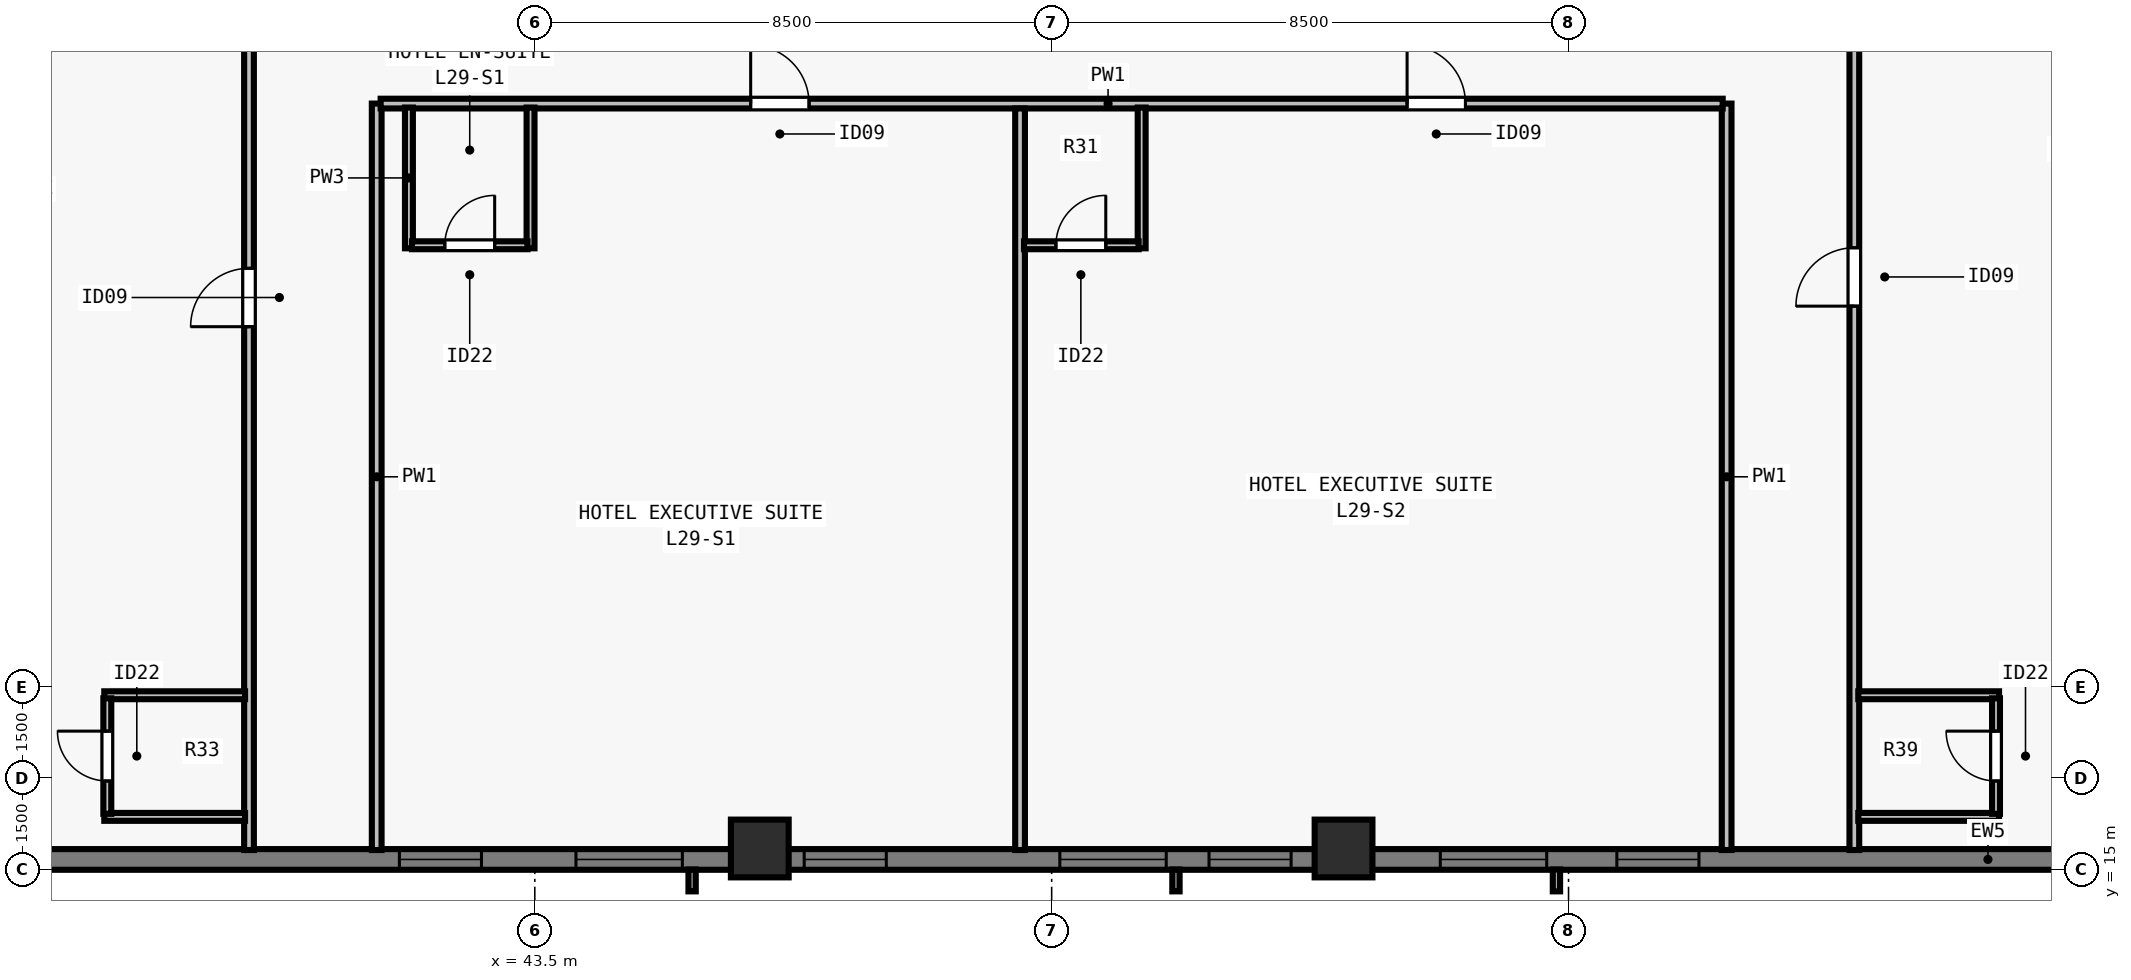
"""IFC4 building model, lengths in metres.
Left out: names, types, materials, properties, quantities, classifications, styles, units other than length and angle.
Written with IfcOpenShell. Run it as: python <this file> out.ifc"""

import sys

from ifc_helpers import new_model, si_unit, direction, frame, frame_2d, origin, origin_2d, place, context, subcontext, project, spatial, rectangle, extrude, element, fill, save


model = new_model("IFC4")
c1 = context("Model", 3, precision=1e-05, world=origin(), true_north=direction((0.0, 1.0)))
c2 = subcontext(c1, "Body", "Model", "MODEL_VIEW")
j1 = project(units=[si_unit("LENGTHUNIT", "METRE"), si_unit("PLANEANGLEUNIT", "RADIAN")], contexts=[c1])
p1 = place(None, origin())
s1 = spatial("IfcSite", under=j1, at=p1, CompositionType="ELEMENT")
p2 = place(p1, origin())
s2 = spatial("IfcBuilding", under=s1, at=p2, CompositionType="ELEMENT")
p3 = place(p2, frame((0.0, 0.0, 109.5)))
s3 = spatial("IfcBuildingStorey", under=s2, at=p3, CompositionType="ELEMENT", Elevation=109.5)
for number, where, z_axis, x_axis in (
    (1, (47.2, 15.35, 0.0), (0.0, 0.0, 1.0), (1.0, 0.0, 0.0)),
    (2, (56.8, 15.35, 0.0), (0.0, 0.0, 1.0), (1.0, 0.0, 0.0)),
):
    element("IfcColumn", number, at=place(p3, frame(where, z_axis=z_axis, x_axis=x_axis)), inside=s3, PredefinedType="COLUMN", context=c2, shape_type="SweptSolid", body=[
        extrude(rectangle(XDim=0.95, YDim=0.95, at=origin_2d()), origin(), (0.0, 0.0, 1.0), 3.5),
    ])
p4 = place(p3, frame((72.0, 15.17, 0.0), z_axis=(0.0, 0.0, 1.0), x_axis=(-1.0, 0.0, 0.0)))
e3 = element("IfcWall", 3, at=p4, inside=s3, PredefinedType="SOLIDWALL", context=c2, shape_type="SweptSolid", body=[
    extrude(rectangle(XDim=39.682, YDim=0.34, at=frame_2d((19.841, 0.0))), origin(), (0.0, 0.0, 1.0), 3.28),
])
p5 = place(p4, frame((9.355, 0.0, 0.8)))
e4 = element("IfcOpeningElement", 4, at=p5, cuts=e3, PredefinedType="OPENING", context=c2, shape_type="SweptSolid", body=[
    extrude(rectangle(XDim=1.35, YDim=1.66, at=frame_2d((0.675, 0.83))), frame((0.0, 0.18, 0.0), z_axis=(0.0, -1.0, 0.0), x_axis=(1.0, 0.0, 0.0)), (0.0, 0.0, 1.0), 0.36),
])
p6 = place(p4, frame((11.859, 0.0, 0.8)))
e5 = element("IfcOpeningElement", 5, at=p6, cuts=e3, PredefinedType="OPENING", context=c2, shape_type="SweptSolid", body=[
    extrude(rectangle(XDim=1.75, YDim=1.66, at=frame_2d((0.875, 0.83))), frame((0.0, 0.18, 0.0), z_axis=(0.0, -1.0, 0.0), x_axis=(1.0, 0.0, 0.0)), (0.0, 0.0, 1.0), 0.36),
])
p7 = place(p4, frame((16.062, 0.0, 0.8)))
e6 = element("IfcOpeningElement", 6, at=p7, cuts=e3, PredefinedType="OPENING", context=c2, shape_type="SweptSolid", body=[
    extrude(rectangle(XDim=1.35, YDim=1.66, at=frame_2d((0.675, 0.83))), frame((0.0, 0.18, 0.0), z_axis=(0.0, -1.0, 0.0), x_axis=(1.0, 0.0, 0.0)), (0.0, 0.0, 1.0), 0.36),
])
p8 = place(p4, frame((18.116, 0.0, 0.8)))
e7 = element("IfcOpeningElement", 7, at=p8, cuts=e3, PredefinedType="OPENING", context=c2, shape_type="SweptSolid", body=[
    extrude(rectangle(XDim=1.75, YDim=1.66, at=frame_2d((0.875, 0.83))), frame((0.0, 0.18, 0.0), z_axis=(0.0, -1.0, 0.0), x_axis=(1.0, 0.0, 0.0)), (0.0, 0.0, 1.0), 0.36),
])
p9 = place(p4, frame((22.719, 0.0, 0.8)))
e8 = element("IfcOpeningElement", 8, at=p9, cuts=e3, PredefinedType="OPENING", context=c2, shape_type="SweptSolid", body=[
    extrude(rectangle(XDim=1.35, YDim=1.66, at=frame_2d((0.675, 0.83))), frame((0.0, 0.18, 0.0), z_axis=(0.0, -1.0, 0.0), x_axis=(1.0, 0.0, 0.0)), (0.0, 0.0, 1.0), 0.36),
])
p10 = place(p4, frame((26.073, 0.0, 0.8)))
e9 = element("IfcOpeningElement", 9, at=p10, cuts=e3, PredefinedType="OPENING", context=c2, shape_type="SweptSolid", body=[
    extrude(rectangle(XDim=1.75, YDim=1.66, at=frame_2d((0.875, 0.83))), frame((0.0, 0.18, 0.0), z_axis=(0.0, -1.0, 0.0), x_axis=(1.0, 0.0, 0.0)), (0.0, 0.0, 1.0), 0.36),
])
p11 = place(p4, frame((29.377, 0.0, 0.8)))
e10 = element("IfcOpeningElement", 10, at=p11, cuts=e3, PredefinedType="OPENING", context=c2, shape_type="SweptSolid", body=[
    extrude(rectangle(XDim=1.35, YDim=1.66, at=frame_2d((0.675, 0.83))), frame((0.0, 0.18, 0.0), z_axis=(0.0, -1.0, 0.0), x_axis=(1.0, 0.0, 0.0)), (0.0, 0.0, 1.0), 0.36),
])
p12 = place(p3, frame((38.8, 15.325, 0.0), z_axis=(0.0, 0.0, 1.0), x_axis=(0.0, 1.0, 0.0)))
e11 = element("IfcWall", 11, at=p12, inside=s3, PredefinedType="PARTITIONING", context=c2, shape_type="SweptSolid", body=[
    extrude(rectangle(XDim=47.35, YDim=0.16, at=frame_2d((23.675, 0.0))), origin(), (0.0, 0.0, 1.0), 2.555),
])
p13 = place(p12, frame((8.606, 0.0, 0.0)))
e12 = element("IfcOpeningElement", 12, at=p13, cuts=e11, PredefinedType="OPENING", context=c2, shape_type="SweptSolid", body=[
    extrude(rectangle(XDim=0.96, YDim=2.15, at=frame_2d((0.48, 1.075))), frame((0.0, 0.09, 0.0), z_axis=(0.0, -1.0, 0.0), x_axis=(1.0, 0.0, 0.0)), (0.0, 0.0, 1.0), 0.18),
])
p14 = place(p12, frame((24.218, 0.0, 0.0)))
e13 = element("IfcOpeningElement", 13, at=p14, cuts=e11, PredefinedType="OPENING", context=c2, shape_type="SweptSolid", body=[
    extrude(rectangle(XDim=0.96, YDim=2.15, at=frame_2d((0.48, 1.075))), frame((0.0, 0.09, 0.0), z_axis=(0.0, -1.0, 0.0), x_axis=(1.0, 0.0, 0.0)), (0.0, 0.0, 1.0), 0.18),
])
p15 = place(p12, frame((40.107, 0.0, 0.0)))
e14 = element("IfcOpeningElement", 14, at=p15, cuts=e11, PredefinedType="OPENING", context=c2, shape_type="SweptSolid", body=[
    extrude(rectangle(XDim=0.96, YDim=2.15, at=frame_2d((0.48, 1.075))), frame((0.0, 0.09, 0.0), z_axis=(0.0, -1.0, 0.0), x_axis=(1.0, 0.0, 0.0)), (0.0, 0.0, 1.0), 0.18),
])
p16 = place(p3, frame((40.9, 15.325, 0.0), z_axis=(0.0, 0.0, 1.0), x_axis=(0.0, 1.0, 0.0)))
e15 = element("IfcWall", 15, at=p16, inside=s3, PredefinedType="PARTITIONING", context=c2, shape_type="SweptSolid", body=[
    extrude(rectangle(XDim=12.275, YDim=0.16, at=frame_2d((6.138, 0.0))), origin(), (0.0, 0.0, 1.0), 2.555),
])
p17 = place(p3, frame((65.2, 15.325, 0.0), z_axis=(0.0, 0.0, 1.0), x_axis=(0.0, 1.0, 0.0)))
e16 = element("IfcWall", 16, at=p17, inside=s3, PredefinedType="PARTITIONING", context=c2, shape_type="SweptSolid", body=[
    extrude(rectangle(XDim=47.35, YDim=0.16, at=frame_2d((23.675, 0.0))), origin(), (0.0, 0.0, 1.0), 2.555),
])
p18 = place(p17, frame((8.944, 0.0, 0.0)))
e17 = element("IfcOpeningElement", 17, at=p18, cuts=e16, PredefinedType="OPENING", context=c2, shape_type="SweptSolid", body=[
    extrude(rectangle(XDim=0.96, YDim=2.15, at=frame_2d((0.48, 1.075))), frame((0.0, 0.09, 0.0), z_axis=(0.0, -1.0, 0.0), x_axis=(1.0, 0.0, 0.0)), (0.0, 0.0, 1.0), 0.18),
])
p19 = place(p17, frame((24.322, 0.0, 0.0)))
e18 = element("IfcOpeningElement", 18, at=p19, cuts=e16, PredefinedType="OPENING", context=c2, shape_type="SweptSolid", body=[
    extrude(rectangle(XDim=0.96, YDim=2.15, at=frame_2d((0.48, 1.075))), frame((0.0, 0.09, 0.0), z_axis=(0.0, -1.0, 0.0), x_axis=(1.0, 0.0, 0.0)), (0.0, 0.0, 1.0), 0.18),
])
p20 = place(p17, frame((39.873, 0.0, 0.0)))
e19 = element("IfcOpeningElement", 19, at=p20, cuts=e16, PredefinedType="OPENING", context=c2, shape_type="SweptSolid", body=[
    extrude(rectangle(XDim=0.96, YDim=2.15, at=frame_2d((0.48, 1.075))), frame((0.0, 0.09, 0.0), z_axis=(0.0, -1.0, 0.0), x_axis=(1.0, 0.0, 0.0)), (0.0, 0.0, 1.0), 0.18),
])
p21 = place(p3, frame((63.1, 15.325, 0.0), z_axis=(0.0, 0.0, 1.0), x_axis=(0.0, 1.0, 0.0)))
e20 = element("IfcWall", 20, at=p21, inside=s3, PredefinedType="PARTITIONING", context=c2, shape_type="SweptSolid", body=[
    extrude(rectangle(XDim=12.275, YDim=0.16, at=frame_2d((6.138, 0.0))), origin(), (0.0, 0.0, 1.0), 2.555),
])
p22 = place(p3, frame((40.965, 27.6, 0.0), z_axis=(0.0, 0.0, 1.0), x_axis=(1.0, 0.0, 0.0)))
e21 = element("IfcWall", 21, at=p22, inside=s3, PredefinedType="PARTITIONING", context=c2, shape_type="SweptSolid", body=[
    extrude(rectangle(XDim=22.07, YDim=0.16, at=frame_2d((11.035, 0.0))), origin(), (0.0, 0.0, 1.0), 3.28),
])
p23 = place(p22, frame((6.085, 0.0, 0.0)))
e22 = element("IfcOpeningElement", 22, at=p23, cuts=e21, PredefinedType="OPENING", context=c2, shape_type="SweptSolid", body=[
    extrude(rectangle(XDim=0.96, YDim=2.15, at=frame_2d((0.48, 1.075))), frame((0.0, 0.09, 0.0), z_axis=(0.0, -1.0, 0.0), x_axis=(1.0, 0.0, 0.0)), (0.0, 0.0, 1.0), 0.18),
])
p24 = place(p22, frame((16.88, 0.0, 0.0)))
e23 = element("IfcOpeningElement", 23, at=p24, cuts=e21, PredefinedType="OPENING", context=c2, shape_type="SweptSolid", body=[
    extrude(rectangle(XDim=0.96, YDim=2.15, at=frame_2d((0.48, 1.075))), frame((0.0, 0.09, 0.0), z_axis=(0.0, -1.0, 0.0), x_axis=(1.0, 0.0, 0.0)), (0.0, 0.0, 1.0), 0.18),
])
for number, where, z_axis, x_axis in (
    (24, (41.43, 25.22, 0.0), (0.0, 0.0, 1.0), (0.0, 1.0, 0.0)),
    (25, (43.43, 25.22, 0.0), (0.0, 0.0, 1.0), (0.0, 1.0, 0.0)),
):
    element("IfcWall", number, at=place(p3, frame(where, z_axis=z_axis, x_axis=x_axis)), inside=s3, PredefinedType="PLUMBINGWALL", context=c2, shape_type="SweptSolid", body=[
        extrude(rectangle(XDim=2.315, YDim=0.13, at=frame_2d((1.157, 0.0))), origin(), (0.0, 0.0, 1.0), 3.28),
    ])
p25 = place(p3, frame((41.48, 25.27, 0.0), z_axis=(0.0, 0.0, 1.0), x_axis=(1.0, 0.0, 0.0)))
e26 = element("IfcWall", 26, at=p25, inside=s3, PredefinedType="PLUMBINGWALL", context=c2, shape_type="SweptSolid", body=[
    extrude(rectangle(XDim=1.9, YDim=0.13, at=frame_2d((0.95, 0.0))), origin(), (0.0, 0.0, 1.0), 3.28),
])
p26 = place(p25, frame((0.54, 0.0, 0.0)))
e27 = element("IfcOpeningElement", 27, at=p26, cuts=e26, PredefinedType="OPENING", context=c2, shape_type="SweptSolid", body=[
    extrude(rectangle(XDim=0.82, YDim=2.1, at=frame_2d((0.41, 1.05))), frame((0.0, 0.075, 0.0), z_axis=(0.0, -1.0, 0.0), x_axis=(1.0, 0.0, 0.0)), (0.0, 0.0, 1.0), 0.15),
])
p27 = place(p3, frame((51.48, 15.325, 0.0), z_axis=(0.0, 0.0, 1.0), x_axis=(0.0, 1.0, 0.0)))
e28 = element("IfcWall", 28, at=p27, inside=s3, PredefinedType="PARTITIONING", context=c2, shape_type="SweptSolid", body=[
    extrude(rectangle(XDim=12.195, YDim=0.16, at=frame_2d((6.098, 0.0))), origin(), (0.0, 0.0, 1.0), 2.896),
])
p28 = place(p3, frame((53.48, 25.22, 0.0), z_axis=(0.0, 0.0, 1.0), x_axis=(0.0, 1.0, 0.0)))
e29 = element("IfcWall", 29, at=p28, inside=s3, PredefinedType="PLUMBINGWALL", context=c2, shape_type="SweptSolid", body=[
    extrude(rectangle(XDim=2.315, YDim=0.13, at=frame_2d((1.157, 0.0))), origin(), (0.0, 0.0, 1.0), 2.896),
])
p29 = place(p3, frame((51.545, 25.27, 0.0), z_axis=(0.0, 0.0, 1.0), x_axis=(1.0, 0.0, 0.0)))
e30 = element("IfcWall", 30, at=p29, inside=s3, PredefinedType="PLUMBINGWALL", context=c2, shape_type="SweptSolid", body=[
    extrude(rectangle(XDim=1.885, YDim=0.13, at=frame_2d((0.942, 0.0))), origin(), (0.0, 0.0, 1.0), 3.28),
])
p30 = place(p29, frame((0.525, 0.0, 0.0)))
e31 = element("IfcOpeningElement", 31, at=p30, cuts=e30, PredefinedType="OPENING", context=c2, shape_type="SweptSolid", body=[
    extrude(rectangle(XDim=0.82, YDim=2.1, at=frame_2d((0.41, 1.05))), frame((0.0, 0.075, 0.0), z_axis=(0.0, -1.0, 0.0), x_axis=(1.0, 0.0, 0.0)), (0.0, 0.0, 1.0), 0.15),
])
for number, where, z_axis, x_axis in (
    (32, (36.42, 15.87, 0.0), (0.0, 0.0, 1.0), (1.0, 0.0, 0.0)),
    (33, (36.42, 17.87, 0.0), (0.0, 0.0, 1.0), (1.0, 0.0, 0.0)),
):
    element("IfcWall", number, at=place(p3, frame(where, z_axis=z_axis, x_axis=x_axis)), inside=s3, PredefinedType="PLUMBINGWALL", context=c2, shape_type="SweptSolid", body=[
        extrude(rectangle(XDim=2.315, YDim=0.13, at=frame_2d((1.158, 0.0))), origin(), (0.0, 0.0, 1.0), 3.28),
    ])
p31 = place(p3, frame((36.47, 15.92, 0.0), z_axis=(0.0, 0.0, 1.0), x_axis=(0.0, 1.0, 0.0)))
e34 = element("IfcWall", 34, at=p31, inside=s3, PredefinedType="PLUMBINGWALL", context=c2, shape_type="SweptSolid", body=[
    extrude(rectangle(XDim=1.9, YDim=0.13, at=frame_2d((0.95, 0.0))), origin(), (0.0, 0.0, 1.0), 3.28),
])
p32 = place(p31, frame((0.54, 0.0, 0.0)))
e35 = element("IfcOpeningElement", 35, at=p32, cuts=e34, PredefinedType="OPENING", context=c2, shape_type="SweptSolid", body=[
    extrude(rectangle(XDim=0.82, YDim=2.1, at=frame_2d((0.41, 1.05))), frame((0.0, 0.075, 0.0), z_axis=(0.0, -1.0, 0.0), x_axis=(1.0, 0.0, 0.0)), (0.0, 0.0, 1.0), 0.15),
])
for number, where, z_axis, x_axis in (
    (36, (65.265, 15.87, 0.0), (0.0, 0.0, 1.0), (1.0, 0.0, 0.0)),
    (37, (65.265, 17.87, 0.0), (0.0, 0.0, 1.0), (1.0, 0.0, 0.0)),
):
    element("IfcWall", number, at=place(p3, frame(where, z_axis=z_axis, x_axis=x_axis)), inside=s3, PredefinedType="PLUMBINGWALL", context=c2, shape_type="SweptSolid", body=[
        extrude(rectangle(XDim=2.315, YDim=0.13, at=frame_2d((1.158, 0.0))), origin(), (0.0, 0.0, 1.0), 3.28),
    ])
p33 = place(p3, frame((67.53, 15.92, 0.0), z_axis=(0.0, 0.0, 1.0), x_axis=(0.0, 1.0, 0.0)))
e38 = element("IfcWall", 38, at=p33, inside=s3, PredefinedType="PLUMBINGWALL", context=c2, shape_type="SweptSolid", body=[
    extrude(rectangle(XDim=1.9, YDim=0.13, at=frame_2d((0.95, 0.0))), origin(), (0.0, 0.0, 1.0), 3.28),
])
p34 = place(p33, frame((0.54, 0.0, 0.0)))
e39 = element("IfcOpeningElement", 39, at=p34, cuts=e38, PredefinedType="OPENING", context=c2, shape_type="SweptSolid", body=[
    extrude(rectangle(XDim=0.82, YDim=2.1, at=frame_2d((0.41, 1.05))), frame((0.0, 0.075, 0.0), z_axis=(0.0, -1.0, 0.0), x_axis=(1.0, 0.0, 0.0)), (0.0, 0.0, 1.0), 0.15),
])
p35 = place(p5, origin())
e40 = element("IfcWindow", 40, at=p35, inside=s3, PartitioningType="SINGLE_PANEL", PredefinedType="WINDOW", context=c2, shape_type="SweptSolid", body=[
    extrude(rectangle(XDim=1.35, YDim=1.66, at=frame_2d((0.675, 0.83))), frame((0.0, -0.05, 0.0), z_axis=(0.0, -1.0, 0.0), x_axis=(1.0, 0.0, 0.0)), (0.0, 0.0, 1.0), 0.06),
])
fill(e4, e40)
p36 = place(p6, origin())
e41 = element("IfcWindow", 41, at=p36, inside=s3, PartitioningType="SINGLE_PANEL", PredefinedType="WINDOW", context=c2, shape_type="SweptSolid", body=[
    extrude(rectangle(XDim=1.75, YDim=1.66, at=frame_2d((0.875, 0.83))), frame((0.0, -0.05, 0.0), z_axis=(0.0, -1.0, 0.0), x_axis=(1.0, 0.0, 0.0)), (0.0, 0.0, 1.0), 0.06),
])
fill(e5, e41)
p37 = place(p7, origin())
e42 = element("IfcWindow", 42, at=p37, inside=s3, PartitioningType="SINGLE_PANEL", PredefinedType="WINDOW", context=c2, shape_type="SweptSolid", body=[
    extrude(rectangle(XDim=1.35, YDim=1.66, at=frame_2d((0.675, 0.83))), frame((0.0, -0.05, 0.0), z_axis=(0.0, -1.0, 0.0), x_axis=(1.0, 0.0, 0.0)), (0.0, 0.0, 1.0), 0.06),
])
fill(e6, e42)
p38 = place(p8, origin())
e43 = element("IfcWindow", 43, at=p38, inside=s3, PartitioningType="SINGLE_PANEL", PredefinedType="WINDOW", context=c2, shape_type="SweptSolid", body=[
    extrude(rectangle(XDim=1.75, YDim=1.66, at=frame_2d((0.875, 0.83))), frame((0.0, -0.05, 0.0), z_axis=(0.0, -1.0, 0.0), x_axis=(1.0, 0.0, 0.0)), (0.0, 0.0, 1.0), 0.06),
])
fill(e7, e43)
p39 = place(p9, origin())
e44 = element("IfcWindow", 44, at=p39, inside=s3, PartitioningType="SINGLE_PANEL", PredefinedType="WINDOW", context=c2, shape_type="SweptSolid", body=[
    extrude(rectangle(XDim=1.35, YDim=1.66, at=frame_2d((0.675, 0.83))), frame((0.0, -0.05, 0.0), z_axis=(0.0, -1.0, 0.0), x_axis=(1.0, 0.0, 0.0)), (0.0, 0.0, 1.0), 0.06),
])
fill(e8, e44)
p40 = place(p10, origin())
e45 = element("IfcWindow", 45, at=p40, inside=s3, PartitioningType="SINGLE_PANEL", PredefinedType="WINDOW", context=c2, shape_type="SweptSolid", body=[
    extrude(rectangle(XDim=1.75, YDim=1.66, at=frame_2d((0.875, 0.83))), frame((0.0, -0.05, 0.0), z_axis=(0.0, -1.0, 0.0), x_axis=(1.0, 0.0, 0.0)), (0.0, 0.0, 1.0), 0.06),
])
fill(e9, e45)
p41 = place(p11, origin())
e46 = element("IfcWindow", 46, at=p41, inside=s3, PartitioningType="SINGLE_PANEL", PredefinedType="WINDOW", context=c2, shape_type="SweptSolid", body=[
    extrude(rectangle(XDim=1.35, YDim=1.66, at=frame_2d((0.675, 0.83))), frame((0.0, -0.05, 0.0), z_axis=(0.0, -1.0, 0.0), x_axis=(1.0, 0.0, 0.0)), (0.0, 0.0, 1.0), 0.06),
])
fill(e10, e46)
p42 = place(p26, origin())
e47 = element("IfcDoor", 47, at=p42, inside=s3, OperationType="SINGLE_SWING_RIGHT", PredefinedType="DOOR", context=c2, shape_type="SweptSolid", body=[
    extrude(rectangle(XDim=0.82, YDim=2.1, at=frame_2d((0.41, 1.05))), frame((0.0, 0.025, 0.0), z_axis=(0.0, -1.0, 0.0), x_axis=(1.0, 0.0, 0.0)), (0.0, 0.0, 1.0), 0.05),
])
fill(e27, e47)
p43 = place(p23, origin())
e48 = element("IfcDoor", 48, at=p43, inside=s3, OperationType="SINGLE_SWING_LEFT", PredefinedType="DOOR", context=c2, shape_type="SweptSolid", body=[
    extrude(rectangle(XDim=0.96, YDim=2.15, at=frame_2d((0.48, 1.075))), frame((0.0, 0.025, 0.0), z_axis=(0.0, -1.0, 0.0), x_axis=(1.0, 0.0, 0.0)), (0.0, 0.0, 1.0), 0.05),
])
fill(e22, e48)
p44 = place(p30, origin())
e49 = element("IfcDoor", 49, at=p44, inside=s3, OperationType="SINGLE_SWING_RIGHT", PredefinedType="DOOR", context=c2, shape_type="SweptSolid", body=[
    extrude(rectangle(XDim=0.82, YDim=2.1, at=frame_2d((0.41, 1.05))), frame((0.0, 0.025, 0.0), z_axis=(0.0, -1.0, 0.0), x_axis=(1.0, 0.0, 0.0)), (0.0, 0.0, 1.0), 0.05),
])
fill(e31, e49)
p45 = place(p24, origin())
e50 = element("IfcDoor", 50, at=p45, inside=s3, OperationType="SINGLE_SWING_LEFT", PredefinedType="DOOR", context=c2, shape_type="SweptSolid", body=[
    extrude(rectangle(XDim=0.96, YDim=2.15, at=frame_2d((0.48, 1.075))), frame((0.0, 0.025, 0.0), z_axis=(0.0, -1.0, 0.0), x_axis=(1.0, 0.0, 0.0)), (0.0, 0.0, 1.0), 0.05),
])
fill(e23, e50)
p46 = place(p32, origin())
e51 = element("IfcDoor", 51, at=p46, inside=s3, OperationType="SINGLE_SWING_RIGHT", PredefinedType="DOOR", context=c2, shape_type="SweptSolid", body=[
    extrude(rectangle(XDim=0.82, YDim=2.1, at=frame_2d((0.41, 1.05))), frame((0.0, 0.025, 0.0), z_axis=(0.0, -1.0, 0.0), x_axis=(1.0, 0.0, 0.0)), (0.0, 0.0, 1.0), 0.05),
])
fill(e35, e51)
p47 = place(p13, origin())
e52 = element("IfcDoor", 52, at=p47, inside=s3, OperationType="SINGLE_SWING_LEFT", PredefinedType="DOOR", context=c2, shape_type="SweptSolid", body=[
    extrude(rectangle(XDim=0.96, YDim=2.15, at=frame_2d((0.48, 1.075))), frame((0.0, 0.025, 0.0), z_axis=(0.0, -1.0, 0.0), x_axis=(1.0, 0.0, 0.0)), (0.0, 0.0, 1.0), 0.05),
])
fill(e12, e52)
p48 = place(p34, origin())
e53 = element("IfcDoor", 53, at=p48, inside=s3, OperationType="SINGLE_SWING_RIGHT", PredefinedType="DOOR", context=c2, shape_type="SweptSolid", body=[
    extrude(rectangle(XDim=0.82, YDim=2.1, at=frame_2d((0.41, 1.05))), frame((0.0, 0.025, 0.0), z_axis=(0.0, -1.0, 0.0), x_axis=(1.0, 0.0, 0.0)), (0.0, 0.0, 1.0), 0.05),
])
fill(e39, e53)
p49 = place(p18, origin())
e54 = element("IfcDoor", 54, at=p49, inside=s3, OperationType="SINGLE_SWING_LEFT", PredefinedType="DOOR", context=c2, shape_type="SweptSolid", body=[
    extrude(rectangle(XDim=0.96, YDim=2.15, at=frame_2d((0.48, 1.075))), frame((0.0, 0.025, 0.0), z_axis=(0.0, -1.0, 0.0), x_axis=(1.0, 0.0, 0.0)), (0.0, 0.0, 1.0), 0.05),
])
fill(e17, e54)
save(model, sys.argv[1])
